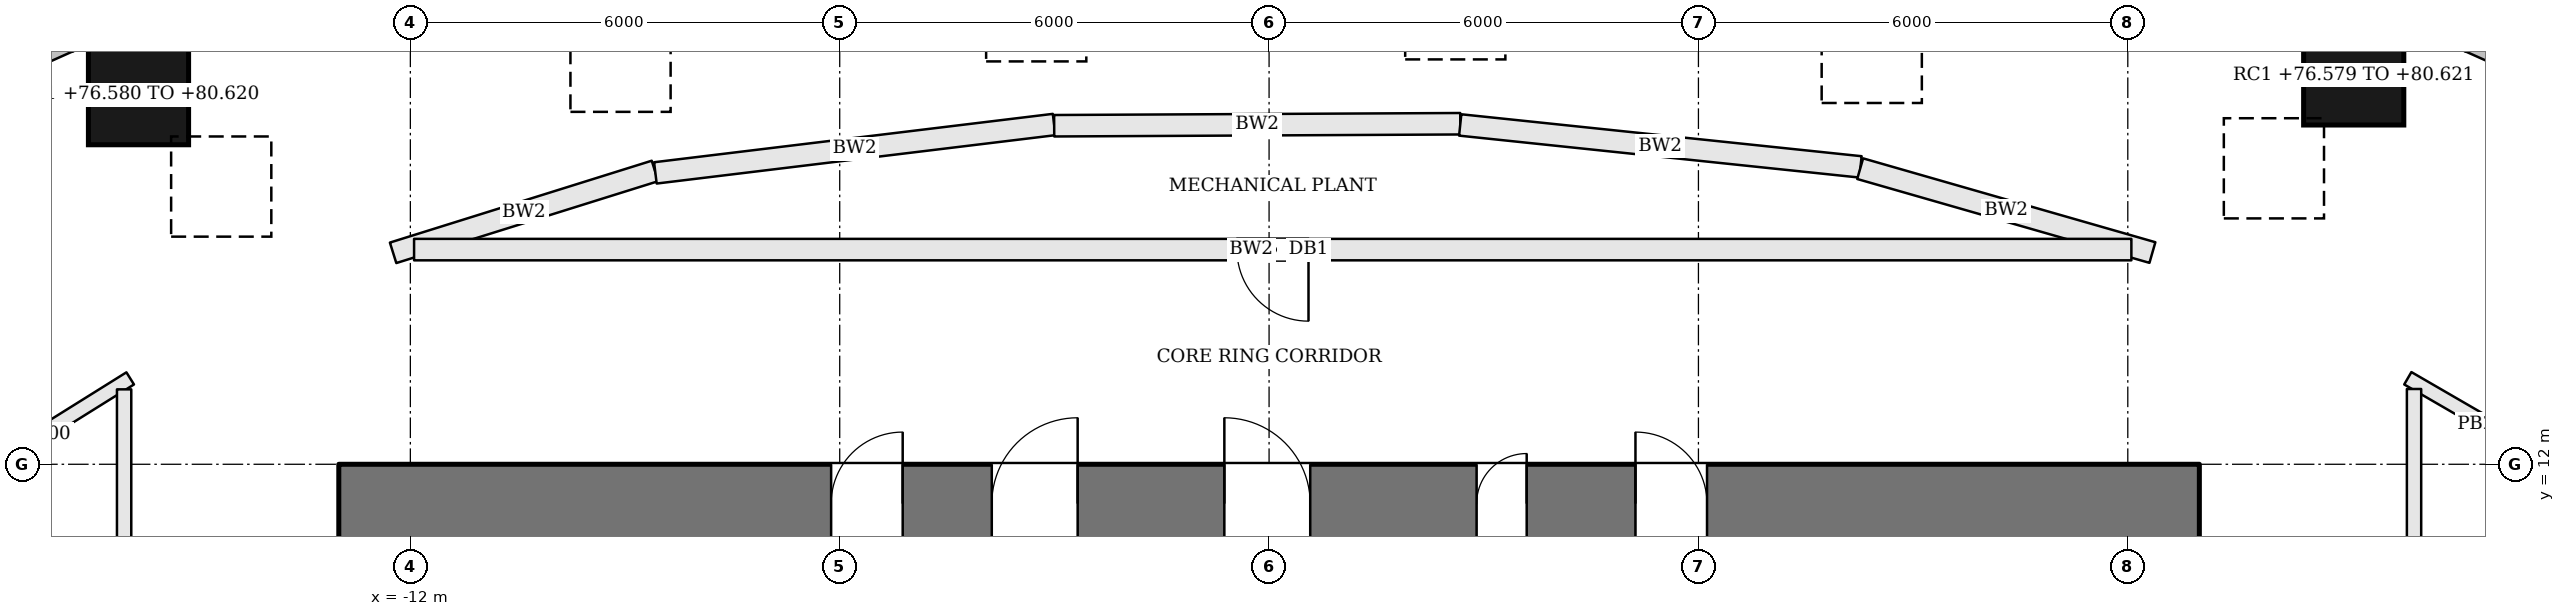
"""IFC4 building model, lengths in metres.
Left out: names, types, materials, properties, quantities, classifications, styles, units other than length and angle.
Written with IfcOpenShell. Run it as: python <this file> out.ifc"""

import sys

from ifc_helpers import new_model, si_unit, direction, frame, frame_2d, origin, origin_2d, place, context, subcontext, project, spatial, rectangle, extrude, element, fill, save


model = new_model("IFC4")
c1 = context("Model", 3, precision=1e-05, world=origin(), true_north=direction((0.0, 1.0)))
c2 = subcontext(c1, "Body", "Model", "MODEL_VIEW")
j1 = project(units=[si_unit("LENGTHUNIT", "METRE"), si_unit("PLANEANGLEUNIT", "RADIAN")], contexts=[c1])
p1 = place(None, origin())
s1 = spatial("IfcSite", under=j1, at=p1, CompositionType="ELEMENT")
p2 = place(p1, origin())
s2 = spatial("IfcBuilding", under=s1, at=p2, CompositionType="ELEMENT")
p3 = place(p2, frame((0.0, 0.0, 77.1)))
s3 = spatial("IfcBuildingStorey", under=s2, at=p3, CompositionType="ELEMENT", Elevation=77.1)
p4 = place(p3, frame((-13.0, 11.45, 0.0), z_axis=(0.0, 0.0, 1.0), x_axis=(1.0, 0.0, 0.0)))
e1 = element("IfcWall", 1, at=p4, inside=s3, PredefinedType="SHEAR", context=c2, shape_type="SweptSolid", body=[
    extrude(rectangle(XDim=26.0, YDim=1.1, at=frame_2d((13.0, 0.0))), origin(), (0.0, 0.0, 1.0), 4.5),
])
p5 = place(p4, frame((9.125, 0.0, 0.0)))
e2 = element("IfcOpeningElement", 2, at=p5, cuts=e1, PredefinedType="OPENING", context=c2, shape_type="SweptSolid", body=[
    extrude(rectangle(XDim=1.2, YDim=2.1, at=frame_2d((0.6, 1.05))), frame((0.0, 0.56, 0.0), z_axis=(0.0, -1.0, 0.0), x_axis=(1.0, 0.0, 0.0)), (0.0, 0.0, 1.0), 1.12),
])
p6 = place(p4, frame((12.375, 0.0, 0.0)))
e3 = element("IfcOpeningElement", 3, at=p6, cuts=e1, PredefinedType="OPENING", context=c2, shape_type="SweptSolid", body=[
    extrude(rectangle(XDim=1.2, YDim=2.1, at=frame_2d((0.6, 1.05))), frame((0.0, 0.56, 0.0), z_axis=(0.0, -1.0, 0.0), x_axis=(1.0, 0.0, 0.0)), (0.0, 0.0, 1.0), 1.12),
])
p7 = place(p4, frame((15.9, 0.0, 0.0)))
e4 = element("IfcOpeningElement", 4, at=p7, cuts=e1, PredefinedType="OPENING", context=c2, shape_type="SweptSolid", body=[
    extrude(rectangle(XDim=0.7, YDim=2.1, at=frame_2d((0.35, 1.05))), frame((0.0, 0.56, 0.0), z_axis=(0.0, -1.0, 0.0), x_axis=(1.0, 0.0, 0.0)), (0.0, 0.0, 1.0), 1.12),
])
p8 = place(p4, frame((6.88, 0.0, 0.0)))
e5 = element("IfcOpeningElement", 5, at=p8, cuts=e1, PredefinedType="OPENING", context=c2, shape_type="SweptSolid", body=[
    extrude(rectangle(XDim=1.0, YDim=2.1, at=frame_2d((0.5, 1.05))), frame((0.0, 0.56, 0.0), z_axis=(0.0, -1.0, 0.0), x_axis=(1.0, 0.0, 0.0)), (0.0, 0.0, 1.0), 1.12),
])
p9 = place(p4, frame((18.12, 0.0, 0.0)))
e6 = element("IfcOpeningElement", 6, at=p9, cuts=e1, PredefinedType="OPENING", context=c2, shape_type="SweptSolid", body=[
    extrude(rectangle(XDim=1.0, YDim=2.1, at=frame_2d((0.5, 1.05))), frame((0.0, 0.56, 0.0), z_axis=(0.0, -1.0, 0.0), x_axis=(1.0, 0.0, 0.0)), (0.0, 0.0, 1.0), 1.12),
])
p10 = place(p3, frame((15.157, 17.441, -0.521), z_axis=(-0.253907371745, -0.297161134657, 0.920448970135), x_axis=(0.760269764075, -0.649607485974, 0.0)))
e7 = element("IfcColumn", 7, at=p10, inside=s3, PredefinedType="COLUMN", context=c2, shape_type="SweptSolid", body=[
    extrude(rectangle(XDim=1.4, YDim=1.4, at=origin_2d()), origin(), (0.0, 0.0, 1.0), 4.391),
])
p11 = place(p3, frame((9.094, 19.192, -0.541), z_axis=(-0.15334867667, -0.329320740959, 0.931682366978), x_axis=(0.906535510121, -0.422129564104, 0.0)))
e8 = element("IfcColumn", 8, at=p11, inside=s3, PredefinedType="COLUMN", context=c2, shape_type="SweptSolid", body=[
    extrude(rectangle(XDim=1.4, YDim=1.4, at=origin_2d()), origin(), (0.0, 0.0, 1.0), 4.381),
])
p12 = place(p3, frame((2.811, 19.854, -0.553), z_axis=(-0.047767571246, -0.341962239014, 0.938498847216), x_axis=(0.990384307253, -0.138343499838, 0.0)))
e9 = element("IfcColumn", 9, at=p12, inside=s3, PredefinedType="COLUMN", context=c2, shape_type="SweptSolid", body=[
    extrude(rectangle(XDim=1.4, YDim=1.4, at=origin_2d()), origin(), (0.0, 0.0, 1.0), 4.375),
])
p13 = place(p3, frame((-3.509, 19.824, -0.553), z_axis=(0.058291782188, -0.341327670053, 0.938135112756), x_axis=(0.985728602585, 0.168342276467, 0.0)))
e10 = element("IfcColumn", 10, at=p13, inside=s3, PredefinedType="COLUMN", context=c2, shape_type="SweptSolid", body=[
    extrude(rectangle(XDim=1.4, YDim=1.4, at=origin_2d()), origin(), (0.0, 0.0, 1.0), 4.377),
])
p14 = place(p3, frame((-9.78, 19.058, -0.539), z_axis=(0.163654041419, -0.327085196844, 0.930716191292), x_axis=(0.894305276314, 0.447457341829, 0.0)))
e11 = element("IfcColumn", 11, at=p14, inside=s3, PredefinedType="COLUMN", context=c2, shape_type="SweptSolid", body=[
    extrude(rectangle(XDim=1.4, YDim=1.4, at=origin_2d()), origin(), (0.0, 0.0, 1.0), 4.381),
])
p15 = place(p3, frame((-15.799, 17.165, -0.52), z_axis=(0.263090632585, -0.292205625505, 0.919455921439), x_axis=(0.743160626591, 0.669113057028, 0.0)))
e12 = element("IfcColumn", 12, at=p15, inside=s3, PredefinedType="COLUMN", context=c2, shape_type="SweptSolid", body=[
    extrude(rectangle(XDim=1.4, YDim=1.4, at=origin_2d()), origin(), (0.0, 0.0, 1.0), 4.394),
])
p16 = place(p3, frame((17.693, 17.58, 0.0), z_axis=(0.0, 0.0, 1.0), x_axis=(-0.912580432801, 0.408897240966, 0.0)))
e13 = element("IfcWall", 13, at=p16, inside=s3, PredefinedType="SOLIDWALL", context=c2, shape_type="SweptSolid", body=[
    extrude(rectangle(XDim=4.021, YDim=0.45, at=frame_2d((2.01, 0.0))), origin(), (0.0, 0.0, 1.0), 4.3),
])
p17 = place(p16, frame((0.96, 0.0, 1.2)))
e14 = element("IfcOpeningElement", 14, at=p17, cuts=e13, PredefinedType="OPENING", context=c2, shape_type="SweptSolid", body=[
    extrude(rectangle(XDim=2.1, YDim=1.8, at=frame_2d((1.05, 0.9))), frame((0.0, 0.235, 0.0), z_axis=(0.0, -1.0, 0.0), x_axis=(1.0, 0.0, 0.0)), (0.0, 0.0, 1.0), 0.47),
])
p18 = place(p3, frame((-14.024, 19.224, 0.0), z_axis=(0.0, 0.0, 1.0), x_axis=(-0.912580432801, -0.408897240966, 0.0)))
e15 = element("IfcWall", 15, at=p18, inside=s3, PredefinedType="SOLIDWALL", context=c2, shape_type="SweptSolid", body=[
    extrude(rectangle(XDim=4.021, YDim=0.45, at=frame_2d((2.01, 0.0))), origin(), (0.0, 0.0, 1.0), 4.3),
])
p19 = place(p18, frame((0.96, 0.0, 1.2)))
e16 = element("IfcOpeningElement", 16, at=p19, cuts=e15, PredefinedType="OPENING", context=c2, shape_type="SweptSolid", body=[
    extrude(rectangle(XDim=2.1, YDim=1.8, at=frame_2d((1.05, 0.9))), frame((0.0, 0.235, 0.0), z_axis=(0.0, -1.0, 0.0), x_axis=(1.0, 0.0, 0.0)), (0.0, 0.0, 1.0), 0.47),
])
p20 = place(p3, frame((-18.422, 11.635, 0.0), z_axis=(0.0, 0.0, 1.0), x_axis=(0.848299824463, 0.529516201656, 0.0)))
e17 = element("IfcWall", 17, at=p20, inside=s3, PredefinedType="PARTITIONING", context=c2, shape_type="SweptSolid", body=[
    extrude(rectangle(XDim=2.955, YDim=0.2, at=frame_2d((1.478, 0.0))), origin(), (0.0, 0.0, 1.0), 4.3),
])
p21 = place(p3, frame((-16.0, 13.047, 0.0), z_axis=(0.0, 0.0, 1.0), x_axis=(0.0, -1.0, 0.0)))
e18 = element("IfcWall", 18, at=p21, inside=s3, PredefinedType="PARTITIONING", context=c2, shape_type="SweptSolid", body=[
    extrude(rectangle(XDim=18.947, YDim=0.2, at=frame_2d((9.474, 0.0))), origin(), (0.0, 0.0, 1.0), 4.3),
])
p22 = place(p21, frame((7.647, 0.0, 0.0)))
e19 = element("IfcOpeningElement", 19, at=p22, cuts=e18, PredefinedType="OPENING", context=c2, shape_type="SweptSolid", body=[
    extrude(rectangle(XDim=1.8, YDim=2.1, at=frame_2d((0.9, 1.05))), frame((0.0, 0.11, 0.0), z_axis=(0.0, -1.0, 0.0), x_axis=(1.0, 0.0, 0.0)), (0.0, 0.0, 1.0), 0.22),
])
p23 = place(p3, frame((15.913, 13.202, 0.0), z_axis=(0.0, 0.0, 1.0), x_axis=(0.86524014554, -0.501357647339, 0.0)))
e20 = element("IfcWall", 20, at=p23, inside=s3, PredefinedType="PARTITIONING", context=c2, shape_type="SweptSolid", body=[
    extrude(rectangle(XDim=2.575, YDim=0.2, at=frame_2d((1.288, 0.0))), origin(), (0.0, 0.0, 1.0), 4.3),
])
p24 = place(p3, frame((16.0, -5.9, 0.0), z_axis=(0.0, 0.0, 1.0), x_axis=(0.0, 1.0, 0.0)))
e21 = element("IfcWall", 21, at=p24, inside=s3, PredefinedType="PARTITIONING", context=c2, shape_type="SweptSolid", body=[
    extrude(rectangle(XDim=18.952, YDim=0.2, at=frame_2d((9.476, 0.0))), origin(), (0.0, 0.0, 1.0), 4.3),
])
p25 = place(p24, frame((9.5, 0.0, 0.0)))
e22 = element("IfcOpeningElement", 22, at=p25, cuts=e21, PredefinedType="OPENING", context=c2, shape_type="SweptSolid", body=[
    extrude(rectangle(XDim=1.8, YDim=2.1, at=frame_2d((0.9, 1.05))), frame((0.0, 0.11, 0.0), z_axis=(0.0, -1.0, 0.0), x_axis=(1.0, 0.0, 0.0)), (0.0, 0.0, 1.0), 0.22),
])
p26 = place(p3, frame((-12.241, 14.955, 0.0), z_axis=(0.0, 0.0, 1.0), x_axis=(0.954433506531, 0.29842366128, 0.0)))
e23 = element("IfcWall", 23, at=p26, inside=s3, PredefinedType="SOLIDWALL", context=c2, shape_type="SweptSolid", body=[
    extrude(rectangle(XDim=3.834, YDim=0.3, at=frame_2d((1.917, 0.0))), origin(), (0.0, 0.0, 1.0), 4.3),
])
p27 = place(p3, frame((-8.576, 16.072, 0.0), z_axis=(0.0, 0.0, 1.0), x_axis=(0.992720392358, 0.120441780942, 0.0)))
e24 = element("IfcWall", 24, at=p27, inside=s3, PredefinedType="SOLIDWALL", context=c2, shape_type="SweptSolid", body=[
    extrude(rectangle(XDim=5.613, YDim=0.3, at=frame_2d((2.806, 0.0))), origin(), (0.0, 0.0, 1.0), 4.3),
])
p28 = place(p3, frame((-3.003, 16.731, 0.0), z_axis=(0.0, 0.0, 1.0), x_axis=(0.999987762334, 0.004947239951, 0.0)))
e25 = element("IfcWall", 25, at=p28, inside=s3, PredefinedType="SOLIDWALL", context=c2, shape_type="SweptSolid", body=[
    extrude(rectangle(XDim=5.675, YDim=0.3, at=frame_2d((2.837, 0.0))), origin(), (0.0, 0.0, 1.0), 4.3),
])
p29 = place(p3, frame((2.671, 16.742, 0.0), z_axis=(0.0, 0.0, 1.0), x_axis=(0.99455907377, -0.104174127222, 0.0)))
e26 = element("IfcWall", 26, at=p29, inside=s3, PredefinedType="SOLIDWALL", context=c2, shape_type="SweptSolid", body=[
    extrude(rectangle(XDim=5.625, YDim=0.3, at=frame_2d((2.812, 0.0))), origin(), (0.0, 0.0, 1.0), 4.3),
])
p30 = place(p3, frame((8.26, 16.131, 0.0), z_axis=(0.0, 0.0, 1.0), x_axis=(0.961195849484, -0.275866886261, 0.0)))
e27 = element("IfcWall", 27, at=p30, inside=s3, PredefinedType="SOLIDWALL", context=c2, shape_type="SweptSolid", body=[
    extrude(rectangle(XDim=4.249, YDim=0.3, at=frame_2d((2.125, 0.0))), origin(), (0.0, 0.0, 1.0), 4.3),
])
p31 = place(p3, frame((12.05, 15.0, 0.0), z_axis=(0.0, 0.0, 1.0), x_axis=(-1.0, 0.0, 0.0)))
e28 = element("IfcWall", 28, at=p31, inside=s3, PredefinedType="SOLIDWALL", context=c2, shape_type="SweptSolid", body=[
    extrude(rectangle(XDim=23.998, YDim=0.3, at=frame_2d((11.999, 0.0))), origin(), (0.0, 0.0, 1.0), 4.3),
])
p32 = place(p31, frame((11.499, 0.0, 0.0)))
e29 = element("IfcOpeningElement", 29, at=p32, cuts=e28, PredefinedType="OPENING", context=c2, shape_type="SweptSolid", body=[
    extrude(rectangle(XDim=1.0, YDim=2.1, at=frame_2d((0.5, 1.05))), frame((0.0, 0.16, 0.0), z_axis=(0.0, -1.0, 0.0), x_axis=(1.0, 0.0, 0.0)), (0.0, 0.0, 1.0), 0.32),
])
p33 = place(p5, origin())
e30 = element("IfcDoor", 30, at=p33, inside=s3, OperationType="SINGLE_SWING_RIGHT", PredefinedType="DOOR", context=c2, shape_type="SweptSolid", body=[
    extrude(rectangle(XDim=1.2, YDim=2.1, at=frame_2d((0.6, 1.05))), frame((0.0, 0.025, 0.0), z_axis=(0.0, -1.0, 0.0), x_axis=(1.0, 0.0, 0.0)), (0.0, 0.0, 1.0), 0.05),
])
fill(e2, e30)
p34 = place(p6, origin())
e31 = element("IfcDoor", 31, at=p34, inside=s3, OperationType="SINGLE_SWING_LEFT", PredefinedType="DOOR", context=c2, shape_type="SweptSolid", body=[
    extrude(rectangle(XDim=1.2, YDim=2.1, at=frame_2d((0.6, 1.05))), frame((0.0, 0.025, 0.0), z_axis=(0.0, -1.0, 0.0), x_axis=(1.0, 0.0, 0.0)), (0.0, 0.0, 1.0), 0.05),
])
fill(e3, e31)
p35 = place(p7, origin())
e32 = element("IfcDoor", 32, at=p35, inside=s3, OperationType="SINGLE_SWING_RIGHT", PredefinedType="DOOR", context=c2, shape_type="SweptSolid", body=[
    extrude(rectangle(XDim=0.7, YDim=2.1, at=frame_2d((0.35, 1.05))), frame((0.0, 0.025, 0.0), z_axis=(0.0, -1.0, 0.0), x_axis=(1.0, 0.0, 0.0)), (0.0, 0.0, 1.0), 0.05),
])
fill(e4, e32)
p36 = place(p8, origin())
e33 = element("IfcDoor", 33, at=p36, inside=s3, OperationType="SINGLE_SWING_RIGHT", PredefinedType="DOOR", context=c2, shape_type="SweptSolid", body=[
    extrude(rectangle(XDim=1.0, YDim=2.1, at=frame_2d((0.5, 1.05))), frame((0.0, 0.025, 0.0), z_axis=(0.0, -1.0, 0.0), x_axis=(1.0, 0.0, 0.0)), (0.0, 0.0, 1.0), 0.05),
])
fill(e5, e33)
p37 = place(p9, origin())
e34 = element("IfcDoor", 34, at=p37, inside=s3, OperationType="SINGLE_SWING_LEFT", PredefinedType="DOOR", context=c2, shape_type="SweptSolid", body=[
    extrude(rectangle(XDim=1.0, YDim=2.1, at=frame_2d((0.5, 1.05))), frame((0.0, 0.025, 0.0), z_axis=(0.0, -1.0, 0.0), x_axis=(1.0, 0.0, 0.0)), (0.0, 0.0, 1.0), 0.05),
])
fill(e6, e34)
p38 = place(p32, origin())
e35 = element("IfcDoor", 35, at=p38, inside=s3, OperationType="SINGLE_SWING_LEFT", PredefinedType="DOOR", context=c2, shape_type="SweptSolid", body=[
    extrude(rectangle(XDim=1.0, YDim=2.1, at=frame_2d((0.5, 1.05))), frame((0.0, 0.025, 0.0), z_axis=(0.0, -1.0, 0.0), x_axis=(1.0, 0.0, 0.0)), (0.0, 0.0, 1.0), 0.05),
])
fill(e29, e35)
save(model, sys.argv[1])
